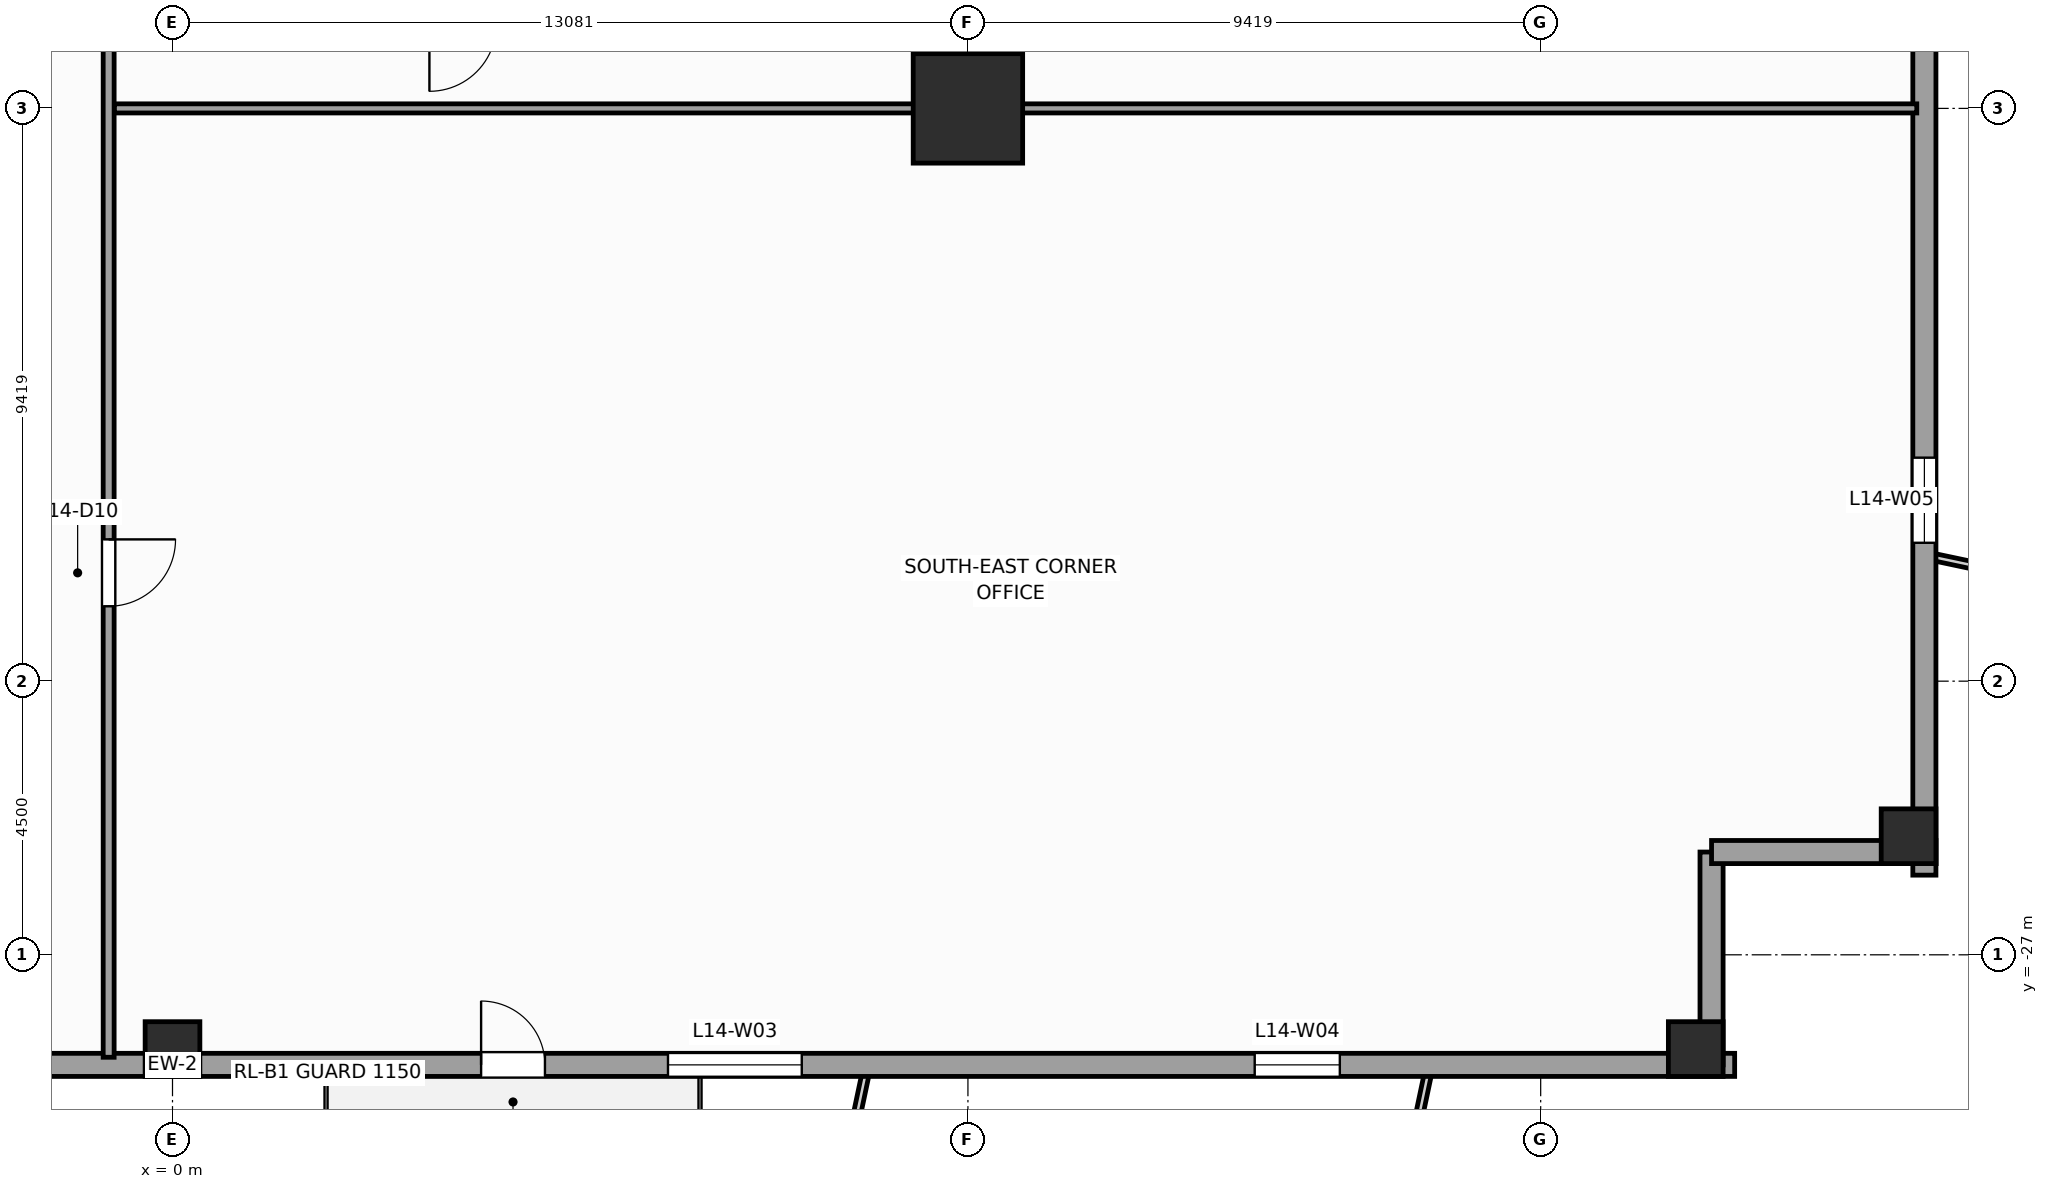
"""IFC4 building model, lengths in metres.
Left out: names, types, materials, properties, quantities, classifications, styles, units other than length and angle.
Written with IfcOpenShell. Run it as: python <this file> out.ifc"""

import sys

from ifc_helpers import new_model, si_unit, direction, frame, frame_2d, origin, origin_2d, place, context, subcontext, project, spatial, rectangle, extrude, source, transform, mapped, element, fill, save


model = new_model("IFC4")
c1 = context("Model", 3, precision=1e-05, world=origin(), true_north=direction((0.0, 1.0)))
c2 = subcontext(c1, "Body", "Model", "MODEL_VIEW")
j1 = project(units=[si_unit("LENGTHUNIT", "METRE"), si_unit("PLANEANGLEUNIT", "RADIAN")], contexts=[c1])
p1 = place(None, origin())
s1 = spatial("IfcSite", under=j1, at=p1, CompositionType="ELEMENT")
p2 = place(p1, origin())
s2 = spatial("IfcBuilding", under=s1, at=p2, CompositionType="ELEMENT")
p3 = place(p2, frame((0.0, 0.0, 62.0)))
s3 = spatial("IfcBuildingStorey", under=s2, at=p3, CompositionType="ELEMENT", Elevation=62.0)
m1 = source(origin(), c2, "Body", "SweptSolid", [
    extrude(rectangle(XDim=1.8, YDim=1.8, at=origin_2d()), origin(), (0.0, 0.0, 1.0), 4.0),
])
p4 = place(p3, frame((13.081, -13.081, 0.0), z_axis=(0.0, 0.0, 1.0), x_axis=(1.0, 0.0, 0.0)))
e1 = element("IfcColumn", 1, at=p4, inside=s3, PredefinedType="COLUMN", context=c2, shape_type="MappedRepresentation", body=[
    mapped(m1, transform((0.0, 0.0, 0.0), scale=1.0)),
])
m2 = source(origin(), c2, "Body", "SweptSolid", [
    extrude(rectangle(XDim=0.9, YDim=0.9, at=origin_2d()), origin(), (0.0, 0.0, 1.0), 4.0),
])
for number, where, z_axis, x_axis in (
    (2, (0.0, -28.55, 0.0), (0.0, 0.0, 1.0), (1.0, 0.0, 0.0)),
    (3, (25.05, -28.55, 0.0), (0.0, 0.0, 1.0), (1.0, 0.0, 0.0)),
    (4, (28.55, -25.05, 0.0), (0.0, 0.0, 1.0), (1.0, 0.0, 0.0)),
):
    element("IfcColumn", number, at=place(p3, frame(where, z_axis=z_axis, x_axis=x_axis)), inside=s3, PredefinedType="COLUMN", context=c2, shape_type="MappedRepresentation", body=[
        mapped(m2, transform((0.0, 0.0, 0.0), scale=1.0)),
    ])
p5 = place(p3, frame((-25.69, -28.81, 0.0), z_axis=(0.0, 0.0, 1.0), x_axis=(1.0, 0.0, 0.0)))
e5 = element("IfcWall", 5, at=p5, inside=s3, PredefinedType="STANDARD", context=c2, shape_type="SweptSolid", body=[
    extrude(rectangle(XDim=51.38, YDim=0.38, at=frame_2d((25.69, 0.0))), origin(), (0.0, 0.0, 1.0), 3.12),
])
p6 = place(p5, frame((30.765, 0.0, 0.0)))
e6 = element("IfcOpeningElement", 6, at=p6, cuts=e5, PredefinedType="OPENING", context=c2, shape_type="SweptSolid", body=[
    extrude(rectangle(XDim=1.05, YDim=2.25, at=frame_2d((0.525, 1.125))), frame((0.0, 0.2, 0.0), z_axis=(0.0, -1.0, 0.0), x_axis=(1.0, 0.0, 0.0)), (0.0, 0.0, 1.0), 0.4),
])
p7 = place(p5, frame((5.466, 0.0, 0.49)))
e7 = element("IfcOpeningElement", 7, at=p7, cuts=e5, PredefinedType="OPENING", context=c2, shape_type="SweptSolid", body=[
    extrude(rectangle(XDim=1.4, YDim=2.4, at=frame_2d((0.7, 1.2))), frame((0.0, 0.2, 0.0), z_axis=(0.0, -1.0, 0.0), x_axis=(1.0, 0.0, 0.0)), (0.0, 0.0, 1.0), 0.4),
])
p8 = place(p5, frame((13.8, 0.0, 0.49)))
e8 = element("IfcOpeningElement", 8, at=p8, cuts=e5, PredefinedType="OPENING", context=c2, shape_type="SweptSolid", body=[
    extrude(rectangle(XDim=2.2, YDim=2.4, at=frame_2d((1.1, 1.2))), frame((0.0, 0.2, 0.0), z_axis=(0.0, -1.0, 0.0), x_axis=(1.0, 0.0, 0.0)), (0.0, 0.0, 1.0), 0.4),
])
p9 = place(p5, frame((33.838, 0.0, 0.49)))
e9 = element("IfcOpeningElement", 9, at=p9, cuts=e5, PredefinedType="OPENING", context=c2, shape_type="SweptSolid", body=[
    extrude(rectangle(XDim=2.2, YDim=2.4, at=frame_2d((1.1, 1.2))), frame((0.0, 0.2, 0.0), z_axis=(0.0, -1.0, 0.0), x_axis=(1.0, 0.0, 0.0)), (0.0, 0.0, 1.0), 0.4),
])
p10 = place(p5, frame((43.487, 0.0, 0.49)))
e10 = element("IfcOpeningElement", 10, at=p10, cuts=e5, PredefinedType="OPENING", context=c2, shape_type="SweptSolid", body=[
    extrude(rectangle(XDim=1.4, YDim=2.4, at=frame_2d((0.7, 1.2))), frame((0.0, 0.2, 0.0), z_axis=(0.0, -1.0, 0.0), x_axis=(1.0, 0.0, 0.0)), (0.0, 0.0, 1.0), 0.4),
])
p11 = place(p3, frame((25.31, -28.81, 0.0), z_axis=(0.0, 0.0, 1.0), x_axis=(0.0, 1.0, 0.0)))
e11 = element("IfcWall", 11, at=p11, inside=s3, PredefinedType="STANDARD", context=c2, shape_type="SweptSolid", body=[
    extrude(rectangle(XDim=3.5, YDim=0.38, at=frame_2d((1.75, 0.0))), origin(), (0.0, 0.0, 1.0), 3.72),
])
p12 = place(p3, frame((25.31, -25.31, 0.0), z_axis=(0.0, 0.0, 1.0), x_axis=(1.0, 0.0, 0.0)))
e12 = element("IfcWall", 12, at=p12, inside=s3, PredefinedType="STANDARD", context=c2, shape_type="SweptSolid", body=[
    extrude(rectangle(XDim=3.69, YDim=0.38, at=frame_2d((1.845, 0.0))), origin(), (0.0, 0.0, 1.0), 3.72),
])
p13 = place(p3, frame((28.81, -25.69, 0.0), z_axis=(0.0, 0.0, 1.0), x_axis=(0.0, 1.0, 0.0)))
e13 = element("IfcWall", 13, at=p13, inside=s3, PredefinedType="STANDARD", context=c2, shape_type="SweptSolid", body=[
    extrude(rectangle(XDim=51.38, YDim=0.38, at=frame_2d((25.69, 0.0))), origin(), (0.0, 0.0, 1.0), 3.12),
])
p14 = place(p13, frame((5.466, 0.0, 0.49)))
e14 = element("IfcOpeningElement", 14, at=p14, cuts=e13, PredefinedType="OPENING", context=c2, shape_type="SweptSolid", body=[
    extrude(rectangle(XDim=1.4, YDim=2.4, at=frame_2d((0.7, 1.2))), frame((0.0, 0.2, 0.0), z_axis=(0.0, -1.0, 0.0), x_axis=(1.0, 0.0, 0.0)), (0.0, 0.0, 1.0), 0.4),
])
p15 = place(p13, frame((13.8, 0.0, 0.49)))
e15 = element("IfcOpeningElement", 15, at=p15, cuts=e13, PredefinedType="OPENING", context=c2, shape_type="SweptSolid", body=[
    extrude(rectangle(XDim=2.2, YDim=2.4, at=frame_2d((1.1, 1.2))), frame((0.0, 0.2, 0.0), z_axis=(0.0, -1.0, 0.0), x_axis=(1.0, 0.0, 0.0)), (0.0, 0.0, 1.0), 0.4),
])
p16 = place(p13, frame((22.062, 0.0, 0.49)))
e16 = element("IfcOpeningElement", 16, at=p16, cuts=e13, PredefinedType="OPENING", context=c2, shape_type="SweptSolid", body=[
    extrude(rectangle(XDim=2.2, YDim=2.4, at=frame_2d((1.1, 1.2))), frame((0.0, 0.2, 0.0), z_axis=(0.0, -1.0, 0.0), x_axis=(1.0, 0.0, 0.0)), (0.0, 0.0, 1.0), 0.4),
])
p17 = place(p13, frame((33.838, 0.0, 0.49)))
e17 = element("IfcOpeningElement", 17, at=p17, cuts=e13, PredefinedType="OPENING", context=c2, shape_type="SweptSolid", body=[
    extrude(rectangle(XDim=2.2, YDim=2.4, at=frame_2d((1.1, 1.2))), frame((0.0, 0.2, 0.0), z_axis=(0.0, -1.0, 0.0), x_axis=(1.0, 0.0, 0.0)), (0.0, 0.0, 1.0), 0.4),
])
p18 = place(p13, frame((43.487, 0.0, 0.49)))
e18 = element("IfcOpeningElement", 18, at=p18, cuts=e13, PredefinedType="OPENING", context=c2, shape_type="SweptSolid", body=[
    extrude(rectangle(XDim=1.4, YDim=2.4, at=frame_2d((0.7, 1.2))), frame((0.0, 0.2, 0.0), z_axis=(0.0, -1.0, 0.0), x_axis=(1.0, 0.0, 0.0)), (0.0, 0.0, 1.0), 0.4),
])
p19 = place(p3, frame((-1.05, -28.685, 0.0), z_axis=(0.0, 0.0, 1.0), x_axis=(0.0, 1.0, 0.0)))
e19 = element("IfcWall", 19, at=p19, inside=s3, PredefinedType="PARTITIONING", context=c2, shape_type="SweptSolid", body=[
    extrude(rectangle(XDim=16.885, YDim=0.18, at=frame_2d((8.442, 0.0))), origin(), (0.0, 0.0, 1.0), 3.72),
])
p20 = place(p19, frame((7.417, 0.0, 0.0)))
e20 = element("IfcOpeningElement", 20, at=p20, cuts=e19, PredefinedType="OPENING", context=c2, shape_type="SweptSolid", body=[
    extrude(rectangle(XDim=1.1, YDim=2.2, at=frame_2d((0.55, 1.1))), frame((0.0, 0.1, 0.0), z_axis=(0.0, -1.0, 0.0), x_axis=(1.0, 0.0, 0.0)), (0.0, 0.0, 1.0), 0.2),
])
p21 = place(p3, frame((-0.955, -13.081, 0.0), z_axis=(0.0, 0.0, 1.0), x_axis=(1.0, 0.0, 0.0)))
e21 = element("IfcWall", 21, at=p21, inside=s3, PredefinedType="PARTITIONING", context=c2, shape_type="SweptSolid", body=[
    extrude(rectangle(XDim=29.64, YDim=0.15, at=frame_2d((14.82, 0.0))), origin(), (0.0, 0.0, 1.0), 2.712),
])
m3 = source(origin(), c2, "Body", "SweptSolid", [
    extrude(rectangle(XDim=1.05, YDim=2.25, at=frame_2d((0.525, 1.125))), frame((0.0, 0.025, 0.0), z_axis=(0.0, -1.0, 0.0), x_axis=(1.0, 0.0, 0.0)), (0.0, 0.0, 1.0), 0.05),
])
p22 = place(p6, origin())
e22 = element("IfcDoor", 22, at=p22, inside=s3, OperationType="SINGLE_SWING_LEFT", PredefinedType="DOOR", context=c2, shape_type="MappedRepresentation", body=[
    mapped(m3, transform((0.0, 0.0, 0.0), scale=1.0)),
])
fill(e6, e22)
m4 = source(origin(), c2, "Body", "SweptSolid", [
    extrude(rectangle(XDim=2.2, YDim=2.4, at=frame_2d((1.1, 1.2))), frame((0.0, 0.03, 0.0), z_axis=(0.0, -1.0, 0.0), x_axis=(1.0, 0.0, 0.0)), (0.0, 0.0, 1.0), 0.06),
])
p23 = place(p9, origin())
e23 = element("IfcWindow", 23, at=p23, inside=s3, PartitioningType="SINGLE_PANEL", PredefinedType="WINDOW", context=c2, shape_type="MappedRepresentation", body=[
    mapped(m4, transform((0.0, 0.0, 0.0), scale=1.0)),
])
fill(e9, e23)
m5 = source(origin(), c2, "Body", "SweptSolid", [
    extrude(rectangle(XDim=1.4, YDim=2.4, at=frame_2d((0.7, 1.2))), frame((0.0, 0.03, 0.0), z_axis=(0.0, -1.0, 0.0), x_axis=(1.0, 0.0, 0.0)), (0.0, 0.0, 1.0), 0.06),
])
p24 = place(p10, origin())
e24 = element("IfcWindow", 24, at=p24, inside=s3, PartitioningType="SINGLE_PANEL", PredefinedType="WINDOW", context=c2, shape_type="MappedRepresentation", body=[
    mapped(m5, transform((0.0, 0.0, 0.0), scale=1.0)),
])
fill(e10, e24)
p25 = place(p14, origin())
e25 = element("IfcWindow", 25, at=p25, inside=s3, PartitioningType="SINGLE_PANEL", PredefinedType="WINDOW", context=c2, shape_type="MappedRepresentation", body=[
    mapped(m5, transform((0.0, 0.0, 0.0), scale=1.0)),
])
fill(e14, e25)
m6 = source(origin(), c2, "Body", "SweptSolid", [
    extrude(rectangle(XDim=1.1, YDim=2.2, at=frame_2d((0.55, 1.1))), frame((0.0, 0.025, 0.0), z_axis=(0.0, -1.0, 0.0), x_axis=(1.0, 0.0, 0.0)), (0.0, 0.0, 1.0), 0.05),
])
p26 = place(p20, frame((1.1, 0.0, 0.0), z_axis=(0.0, 0.0, 1.0), x_axis=(-1.0, 0.0, 0.0)))
e26 = element("IfcDoor", 26, at=p26, inside=s3, OperationType="SINGLE_SWING_RIGHT", PredefinedType="DOOR", context=c2, shape_type="MappedRepresentation", body=[
    mapped(m6, transform((0.0, 0.0, 0.0), scale=1.0)),
])
fill(e20, e26)
save(model, sys.argv[1])
